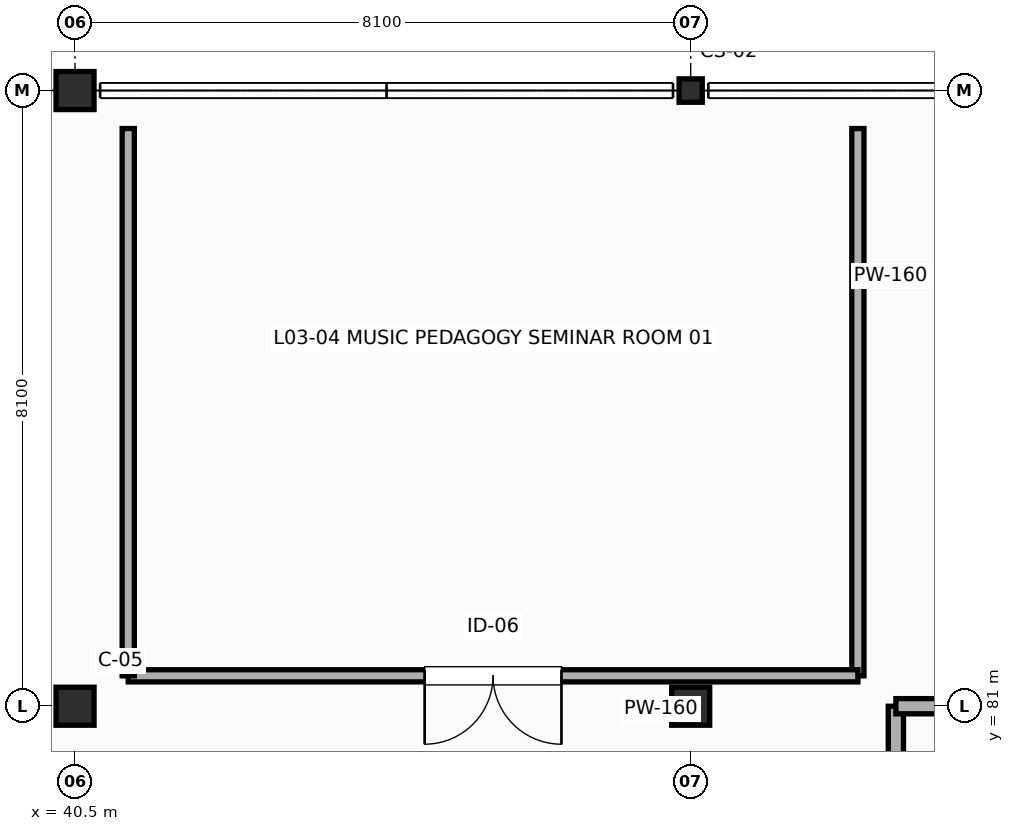
"""IFC4 building model, lengths in metres.
Left out: names, types, materials, properties, quantities, classifications, styles, units other than length and angle.
Written with IfcOpenShell. Run it as: python <this file> out.ifc"""

import sys

from ifc_helpers import new_model, si_unit, direction, frame, frame_2d, origin, origin_2d, place, context, subcontext, project, spatial, rectangle, i_section, extrude, element, fill, save


model = new_model("IFC4")
c1 = context("Model", 3, precision=1e-05, world=origin(), true_north=direction((0.0, 1.0)))
c2 = subcontext(c1, "Body", "Model", "MODEL_VIEW")
j1 = project(units=[si_unit("LENGTHUNIT", "METRE"), si_unit("PLANEANGLEUNIT", "RADIAN")], contexts=[c1])
p1 = place(None, origin())
s1 = spatial("IfcSite", under=j1, at=p1, CompositionType="ELEMENT")
p2 = place(p1, origin())
s2 = spatial("IfcBuilding", under=s1, at=p2, CompositionType="ELEMENT")
p3 = place(p2, frame((0.0, 0.0, 15.0)))
s3 = spatial("IfcBuildingStorey", under=s2, at=p3, CompositionType="ELEMENT", Elevation=15.0)
for number, where, z_axis, x_axis in (
    (1, (40.5, 81.0, 0.0), (0.0, 0.0, 1.0), (1.0, 0.0, 0.0)),
    (2, (40.5, 89.1, 0.0), (0.0, 0.0, 1.0), (1.0, 0.0, 0.0)),
    (3, (48.6, 81.0, 0.0), (0.0, 0.0, 1.0), (1.0, 0.0, 0.0)),
):
    element("IfcColumn", number, at=place(p3, frame(where, z_axis=z_axis, x_axis=x_axis)), inside=s3, PredefinedType="COLUMN", context=c2, shape_type="SweptSolid", body=[
        extrude(rectangle(XDim=0.5, YDim=0.5, at=origin_2d()), origin(), (0.0, 0.0, 1.0), 4.2),
    ])
p4 = place(p3, frame((48.6, 89.1, 0.0), z_axis=(0.0, 0.0, 1.0), x_axis=(1.0, 0.0, 0.0)))
e4 = element("IfcColumn", 4, at=p4, inside=s3, PredefinedType="COLUMN", context=c2, shape_type="SweptSolid", body=[
    extrude(i_section(OverallWidth=0.305, OverallDepth=0.308, WebThickness=0.01, FlangeThickness=0.015, FilletRadius=0.015, at=origin_2d()), origin(), (0.0, 0.0, 1.0), 4.2),
])
p5 = place(p3, frame((51.3, 72.9, 0.0), z_axis=(0.0, 0.0, 1.0), x_axis=(0.0, 1.0, 0.0)))
e5 = element("IfcWall", 5, at=p5, inside=s3, PredefinedType="PARTITIONING", context=c2, shape_type="SweptSolid", body=[
    extrude(rectangle(XDim=8.1, YDim=0.2, at=frame_2d((4.05, 0.0))), origin(), (0.0, 0.0, 1.0), 3.9),
])
p6 = place(p5, frame((3.15, 0.0, 0.0)))
e6 = element("IfcOpeningElement", 6, at=p6, cuts=e5, PredefinedType="OPENING", context=c2, shape_type="SweptSolid", body=[
    extrude(rectangle(XDim=1.8, YDim=2.25, at=frame_2d((0.9, 1.125))), frame((0.0, 0.11, 0.0), z_axis=(0.0, -1.0, 0.0), x_axis=(1.0, 0.0, 0.0)), (0.0, 0.0, 1.0), 0.22),
])
p7 = place(p3, frame((51.3, 81.0, 0.0), z_axis=(0.0, 0.0, 1.0), x_axis=(1.0, 0.0, 0.0)))
e7 = element("IfcWall", 7, at=p7, inside=s3, PredefinedType="PARTITIONING", context=c2, shape_type="SweptSolid", body=[
    extrude(rectangle(XDim=5.47, YDim=0.2, at=frame_2d((2.735, 0.0))), origin(), (0.0, 0.0, 1.0), 3.421),
])
p8 = place(p3, frame((50.8, 88.6, 0.0), z_axis=(0.0, 0.0, 1.0), x_axis=(0.0, -1.0, 0.0)))
e8 = element("IfcWall", 8, at=p8, inside=s3, PredefinedType="PARTITIONING", context=c2, shape_type="SweptSolid", body=[
    extrude(rectangle(XDim=7.2, YDim=0.16, at=frame_2d((3.6, 0.0))), origin(), (0.0, 0.0, 1.0), 3.92),
])
p9 = place(p3, frame((50.8, 81.4, 0.0), z_axis=(0.0, 0.0, 1.0), x_axis=(-1.0, 0.0, 0.0)))
e9 = element("IfcWall", 9, at=p9, inside=s3, PredefinedType="PARTITIONING", context=c2, shape_type="SweptSolid", body=[
    extrude(rectangle(XDim=9.6, YDim=0.16, at=frame_2d((4.8, 0.0))), origin(), (0.0, 0.0, 1.0), 3.92),
])
p10 = place(p9, frame((3.9, 0.0, 0.0)))
e10 = element("IfcOpeningElement", 10, at=p10, cuts=e9, PredefinedType="OPENING", context=c2, shape_type="SweptSolid", body=[
    extrude(rectangle(XDim=1.8, YDim=2.5, at=frame_2d((0.9, 1.25))), frame((0.0, 0.09, 0.0), z_axis=(0.0, -1.0, 0.0), x_axis=(1.0, 0.0, 0.0)), (0.0, 0.0, 1.0), 0.18),
])
p11 = place(p3, frame((41.2, 81.4, 0.0), z_axis=(0.0, 0.0, 1.0), x_axis=(0.0, 1.0, 0.0)))
e11 = element("IfcWall", 11, at=p11, inside=s3, PredefinedType="PARTITIONING", context=c2, shape_type="SweptSolid", body=[
    extrude(rectangle(XDim=7.2, YDim=0.16, at=frame_2d((3.6, 0.0))), origin(), (0.0, 0.0, 1.0), 3.92),
])
p12 = place(p10, origin())
e12 = element("IfcDoor", 12, at=p12, inside=s3, OperationType="DOUBLE_DOOR_SINGLE_SWING", PredefinedType="DOOR", context=c2, shape_type="SweptSolid", body=[
    extrude(rectangle(XDim=1.8, YDim=2.5, at=frame_2d((0.9, 1.25))), frame((0.0, 0.025, 0.0), z_axis=(0.0, -1.0, 0.0), x_axis=(1.0, 0.0, 0.0)), (0.0, 0.0, 1.0), 0.05),
])
fill(e10, e12)
save(model, sys.argv[1])
